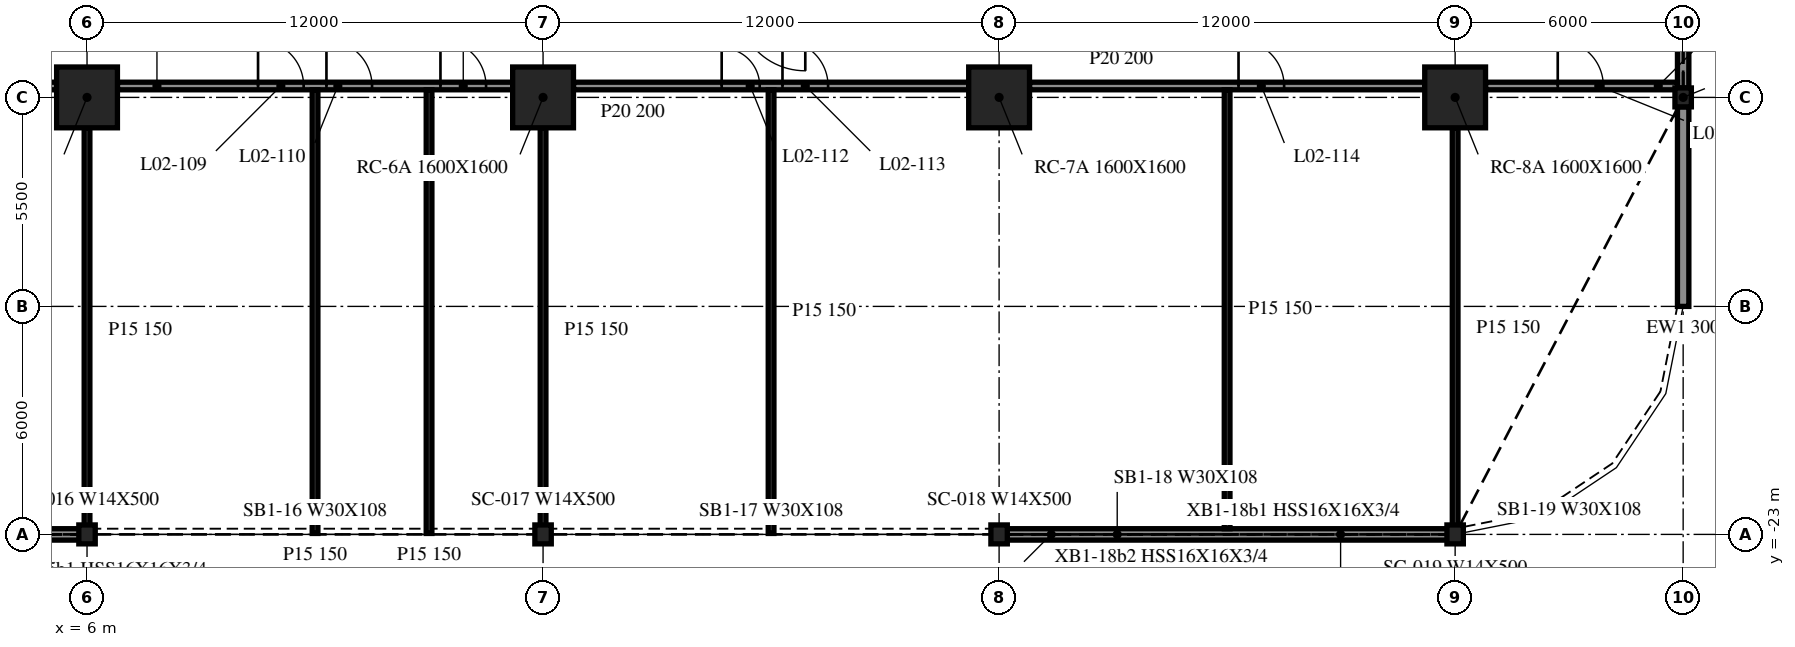
"""IFC4 building model, lengths in metres.
Left out: names, types, materials, properties, quantities, classifications, styles, units other than length and angle.
Written with IfcOpenShell. Run it as: python <this file> out.ifc"""

import sys

from ifc_helpers import new_model, si_unit, direction, frame, frame_2d, origin, origin_2d, place, context, subcontext, project, spatial, rectangle, i_section, extrude, element, fill, save


model = new_model("IFC4")
c1 = context("Model", 3, precision=1e-05, world=origin(), true_north=direction((0.0, 1.0)))
c2 = subcontext(c1, "Body", "Model", "MODEL_VIEW")
j1 = project(units=[si_unit("LENGTHUNIT", "METRE"), si_unit("PLANEANGLEUNIT", "RADIAN")], contexts=[c1])
p1 = place(None, origin())
s1 = spatial("IfcSite", under=j1, at=p1, CompositionType="ELEMENT")
p2 = place(p1, origin())
s2 = spatial("IfcBuilding", under=s1, at=p2, CompositionType="ELEMENT")
p3 = place(p2, frame((0.0, 0.0, 11.5)))
s3 = spatial("IfcBuildingStorey", under=s2, at=p3, CompositionType="ELEMENT", Elevation=11.5)
for number, where, z_axis, x_axis in (
    (1, (6.0, -11.5, -0.34), (0.0, 0.0, 1.0), (1.0, 0.0, 0.0)),
    (2, (18.0, -11.5, -0.34), (0.0, 0.0, 1.0), (1.0, 0.0, 0.0)),
    (3, (30.0, -11.5, -0.34), (0.0, 0.0, 1.0), (1.0, 0.0, 0.0)),
    (4, (42.0, -11.5, -0.34), (0.0, 0.0, 1.0), (1.0, 0.0, 0.0)),
):
    element("IfcColumn", number, at=place(p3, frame(where, z_axis=z_axis, x_axis=x_axis)), inside=s3, PredefinedType="COLUMN", context=c2, shape_type="SweptSolid", body=[
        extrude(rectangle(XDim=1.6, YDim=1.6, at=origin_2d()), origin(), (0.0, 0.0, 1.0), 4.3),
    ])
for number, where, z_axis, x_axis in (
    (5, (6.0, -23.0, -0.34), (0.0, 0.0, 1.0), (1.0, 0.0, 0.0)),
    (6, (18.0, -23.0, -0.34), (0.0, 0.0, 1.0), (1.0, 0.0, 0.0)),
    (7, (30.0, -23.0, -0.34), (0.0, 0.0, 1.0), (1.0, 0.0, 0.0)),
    (8, (42.0, -23.0, -0.34), (0.0, 0.0, 1.0), (1.0, 0.0, 0.0)),
    (9, (48.0, -11.5, -0.34), (0.0, 0.0, 1.0), (1.0, 0.0, 0.0)),
):
    element("IfcColumn", number, at=place(p3, frame(where, z_axis=z_axis, x_axis=x_axis)), inside=s3, PredefinedType="COLUMN", context=c2, shape_type="SweptSolid", body=[
        extrude(i_section(OverallWidth=0.432, OverallDepth=0.498, WebThickness=0.056, FlangeThickness=0.089, at=origin_2d()), origin(), (0.0, 0.0, 1.0), 4.3),
    ])
for number, where, z_axis, x_axis in (
    (10, (-5.972, -23.0, 0.0), (0.0, 0.0, 1.0), (1.0, 0.0, 0.0)),
    (11, (30.028, -23.0, 0.0), (0.0, 0.0, 1.0), (1.0, 0.0, 0.0)),
):
    element("IfcWall", number, at=place(p3, frame(where, z_axis=z_axis, x_axis=x_axis)), inside=s3, PredefinedType="NOTDEFINED", context=c2, shape_type="SweptSolid", body=[
        extrude(rectangle(XDim=11.944, YDim=0.3, at=frame_2d((5.972, 0.0))), origin(), (0.0, 0.0, 1.0), 3.203),
    ])
p4 = place(p3, frame((48.0, -17.0, 0.0), z_axis=(0.0, 0.0, 1.0), x_axis=(0.0, 1.0, 0.0)))
e12 = element("IfcWall", 12, at=p4, inside=s3, PredefinedType="NOTDEFINED", context=c2, shape_type="SweptSolid", body=[
    extrude(rectangle(XDim=5.251, YDim=0.3, at=frame_2d((2.625, 0.0))), origin(), (0.0, 0.0, 1.0), 3.203),
])
p5 = place(p3, frame((48.0, -11.251, 0.0), z_axis=(0.0, 0.0, 1.0), x_axis=(0.0, 1.0, 0.0)))
e13 = element("IfcWall", 13, at=p5, inside=s3, PredefinedType="NOTDEFINED", context=c2, shape_type="SweptSolid", body=[
    extrude(rectangle(XDim=11.002, YDim=0.3, at=frame_2d((5.501, 0.0))), origin(), (0.0, 0.0, 1.0), 3.203),
])
p6 = place(p3, frame((-5.2, -11.2, 0.0), z_axis=(0.0, 0.0, 1.0), x_axis=(1.0, 0.0, 0.0)))
e14 = element("IfcWall", 14, at=p6, inside=s3, PredefinedType="PARTITIONING", context=c2, shape_type="SweptSolid", body=[
    extrude(rectangle(XDim=10.4, YDim=0.2, at=frame_2d((5.2, 0.0))), origin(), (0.0, 0.0, 1.0), 3.96),
])
p7 = place(p6, frame((5.5, 0.0, 0.0)))
e15 = element("IfcOpeningElement", 15, at=p7, cuts=e14, PredefinedType="OPENING", context=c2, shape_type="SweptSolid", body=[
    extrude(rectangle(XDim=1.2, YDim=2.1, at=frame_2d((0.6, 1.05))), frame((0.0, 0.11, 0.0), z_axis=(0.0, -1.0, 0.0), x_axis=(1.0, 0.0, 0.0)), (0.0, 0.0, 1.0), 0.22),
])
p8 = place(p3, frame((6.8, -11.2, 0.0), z_axis=(0.0, 0.0, 1.0), x_axis=(1.0, 0.0, 0.0)))
e16 = element("IfcWall", 16, at=p8, inside=s3, PredefinedType="PARTITIONING", context=c2, shape_type="SweptSolid", body=[
    extrude(rectangle(XDim=10.4, YDim=0.2, at=frame_2d((5.2, 0.0))), origin(), (0.0, 0.0, 1.0), 3.96),
])
p9 = place(p8, frame((3.7, 0.0, 0.0)))
e17 = element("IfcOpeningElement", 17, at=p9, cuts=e16, PredefinedType="OPENING", context=c2, shape_type="SweptSolid", body=[
    extrude(rectangle(XDim=1.2, YDim=2.1, at=frame_2d((0.6, 1.05))), frame((0.0, 0.11, 0.0), z_axis=(0.0, -1.0, 0.0), x_axis=(1.0, 0.0, 0.0)), (0.0, 0.0, 1.0), 0.22),
])
p10 = place(p8, frame((5.5, 0.0, 0.0)))
e18 = element("IfcOpeningElement", 18, at=p10, cuts=e16, PredefinedType="OPENING", context=c2, shape_type="SweptSolid", body=[
    extrude(rectangle(XDim=1.2, YDim=2.1, at=frame_2d((0.6, 1.05))), frame((0.0, 0.11, 0.0), z_axis=(0.0, -1.0, 0.0), x_axis=(1.0, 0.0, 0.0)), (0.0, 0.0, 1.0), 0.22),
])
p11 = place(p8, frame((8.5, 0.0, 0.0)))
e19 = element("IfcOpeningElement", 19, at=p11, cuts=e16, PredefinedType="OPENING", context=c2, shape_type="SweptSolid", body=[
    extrude(rectangle(XDim=1.2, YDim=2.1, at=frame_2d((0.6, 1.05))), frame((0.0, 0.11, 0.0), z_axis=(0.0, -1.0, 0.0), x_axis=(1.0, 0.0, 0.0)), (0.0, 0.0, 1.0), 0.22),
])
p12 = place(p3, frame((18.8, -11.2, 0.0), z_axis=(0.0, 0.0, 1.0), x_axis=(1.0, 0.0, 0.0)))
e20 = element("IfcWall", 20, at=p12, inside=s3, PredefinedType="PARTITIONING", context=c2, shape_type="SweptSolid", body=[
    extrude(rectangle(XDim=10.4, YDim=0.2, at=frame_2d((5.2, 0.0))), origin(), (0.0, 0.0, 1.0), 3.96),
])
p13 = place(p12, frame((3.9, 0.0, 0.0)))
e21 = element("IfcOpeningElement", 21, at=p13, cuts=e20, PredefinedType="OPENING", context=c2, shape_type="SweptSolid", body=[
    extrude(rectangle(XDim=1.0, YDim=2.1, at=frame_2d((0.5, 1.05))), frame((0.0, 0.11, 0.0), z_axis=(0.0, -1.0, 0.0), x_axis=(1.0, 0.0, 0.0)), (0.0, 0.0, 1.0), 0.22),
])
p14 = place(p12, frame((5.5, 0.0, 0.0)))
e22 = element("IfcOpeningElement", 22, at=p14, cuts=e20, PredefinedType="OPENING", context=c2, shape_type="SweptSolid", body=[
    extrude(rectangle(XDim=1.2, YDim=2.1, at=frame_2d((0.6, 1.05))), frame((0.0, 0.11, 0.0), z_axis=(0.0, -1.0, 0.0), x_axis=(1.0, 0.0, 0.0)), (0.0, 0.0, 1.0), 0.22),
])
p15 = place(p3, frame((30.8, -11.2, 0.0), z_axis=(0.0, 0.0, 1.0), x_axis=(1.0, 0.0, 0.0)))
e23 = element("IfcWall", 23, at=p15, inside=s3, PredefinedType="PARTITIONING", context=c2, shape_type="SweptSolid", body=[
    extrude(rectangle(XDim=10.4, YDim=0.2, at=frame_2d((5.2, 0.0))), origin(), (0.0, 0.0, 1.0), 3.96),
])
p16 = place(p15, frame((5.5, 0.0, 0.0)))
e24 = element("IfcOpeningElement", 24, at=p16, cuts=e23, PredefinedType="OPENING", context=c2, shape_type="SweptSolid", body=[
    extrude(rectangle(XDim=1.2, YDim=2.1, at=frame_2d((0.6, 1.05))), frame((0.0, 0.11, 0.0), z_axis=(0.0, -1.0, 0.0), x_axis=(1.0, 0.0, 0.0)), (0.0, 0.0, 1.0), 0.22),
])
p17 = place(p3, frame((42.8, -11.2, 0.0), z_axis=(0.0, 0.0, 1.0), x_axis=(1.0, 0.0, 0.0)))
e25 = element("IfcWall", 25, at=p17, inside=s3, PredefinedType="PARTITIONING", context=c2, shape_type="SweptSolid", body=[
    extrude(rectangle(XDim=5.05, YDim=0.2, at=frame_2d((2.525, 0.0))), origin(), (0.0, 0.0, 1.0), 3.96),
])
p18 = place(p17, frame((1.9, 0.0, 0.0)))
e26 = element("IfcOpeningElement", 26, at=p18, cuts=e25, PredefinedType="OPENING", context=c2, shape_type="SweptSolid", body=[
    extrude(rectangle(XDim=1.2, YDim=2.1, at=frame_2d((0.6, 1.05))), frame((0.0, 0.11, 0.0), z_axis=(0.0, -1.0, 0.0), x_axis=(1.0, 0.0, 0.0)), (0.0, 0.0, 1.0), 0.22),
])
p19 = place(p3, frame((6.0, -22.975, 0.0), z_axis=(0.0, 0.0, 1.0), x_axis=(0.0, 1.0, 0.0)))
e27 = element("IfcWall", 27, at=p19, inside=s3, PredefinedType="PARTITIONING", context=c2, shape_type="SweptSolid", body=[
    extrude(rectangle(XDim=10.675, YDim=0.15, at=frame_2d((5.337, 0.0))), origin(), (0.0, 0.0, 1.0), 3.96),
])
for number, where, z_axis, x_axis in (
    (28, (12.0, -22.975, 0.0), (0.0, 0.0, 1.0), (0.0, 1.0, 0.0)),
    (29, (15.0, -22.975, 0.0), (0.0, 0.0, 1.0), (0.0, 1.0, 0.0)),
):
    element("IfcWall", number, at=place(p3, frame(where, z_axis=z_axis, x_axis=x_axis)), inside=s3, PredefinedType="PARTITIONING", context=c2, shape_type="SweptSolid", body=[
        extrude(rectangle(XDim=11.675, YDim=0.15, at=frame_2d((5.837, 0.0))), origin(), (0.0, 0.0, 1.0), 3.96),
    ])
p20 = place(p3, frame((18.0, -22.975, 0.0), z_axis=(0.0, 0.0, 1.0), x_axis=(0.0, 1.0, 0.0)))
e30 = element("IfcWall", 30, at=p20, inside=s3, PredefinedType="PARTITIONING", context=c2, shape_type="SweptSolid", body=[
    extrude(rectangle(XDim=10.675, YDim=0.15, at=frame_2d((5.337, 0.0))), origin(), (0.0, 0.0, 1.0), 3.96),
])
p21 = place(p3, frame((24.0, -22.975, 0.0), z_axis=(0.0, 0.0, 1.0), x_axis=(0.0, 1.0, 0.0)))
e31 = element("IfcWall", 31, at=p21, inside=s3, PredefinedType="PARTITIONING", context=c2, shape_type="SweptSolid", body=[
    extrude(rectangle(XDim=11.675, YDim=0.15, at=frame_2d((5.837, 0.0))), origin(), (0.0, 0.0, 1.0), 3.96),
])
p22 = place(p3, frame((36.0, -22.85, 0.0), z_axis=(0.0, 0.0, 1.0), x_axis=(0.0, 1.0, 0.0)))
e32 = element("IfcWall", 32, at=p22, inside=s3, PredefinedType="PARTITIONING", context=c2, shape_type="SweptSolid", body=[
    extrude(rectangle(XDim=11.55, YDim=0.15, at=frame_2d((5.775, 0.0))), origin(), (0.0, 0.0, 1.0), 3.96),
])
p23 = place(p3, frame((42.0, -22.847, 0.0), z_axis=(0.0, 0.0, 1.0), x_axis=(0.0, 1.0, 0.0)))
e33 = element("IfcWall", 33, at=p23, inside=s3, PredefinedType="PARTITIONING", context=c2, shape_type="SweptSolid", body=[
    extrude(rectangle(XDim=10.547, YDim=0.15, at=frame_2d((5.273, 0.0))), origin(), (0.0, 0.0, 1.0), 3.96),
])
p24 = place(p9, origin())
e34 = element("IfcDoor", 34, at=p24, inside=s3, OperationType="SINGLE_SWING_RIGHT", PredefinedType="DOOR", context=c2, shape_type="SweptSolid", body=[
    extrude(rectangle(XDim=1.2, YDim=2.1, at=frame_2d((0.6, 1.05))), frame((0.0, 0.025, 0.0), z_axis=(0.0, -1.0, 0.0), x_axis=(1.0, 0.0, 0.0)), (0.0, 0.0, 1.0), 0.05),
])
fill(e17, e34)
p25 = place(p10, origin())
e35 = element("IfcDoor", 35, at=p25, inside=s3, OperationType="SINGLE_SWING_LEFT", PredefinedType="DOOR", context=c2, shape_type="SweptSolid", body=[
    extrude(rectangle(XDim=1.2, YDim=2.1, at=frame_2d((0.6, 1.05))), frame((0.0, 0.025, 0.0), z_axis=(0.0, -1.0, 0.0), x_axis=(1.0, 0.0, 0.0)), (0.0, 0.0, 1.0), 0.05),
])
fill(e18, e35)
p26 = place(p11, origin())
e36 = element("IfcDoor", 36, at=p26, inside=s3, OperationType="SINGLE_SWING_LEFT", PredefinedType="DOOR", context=c2, shape_type="SweptSolid", body=[
    extrude(rectangle(XDim=1.2, YDim=2.1, at=frame_2d((0.6, 1.05))), frame((0.0, 0.025, 0.0), z_axis=(0.0, -1.0, 0.0), x_axis=(1.0, 0.0, 0.0)), (0.0, 0.0, 1.0), 0.05),
])
fill(e19, e36)
p27 = place(p13, origin())
e37 = element("IfcDoor", 37, at=p27, inside=s3, OperationType="SINGLE_SWING_RIGHT", PredefinedType="DOOR", context=c2, shape_type="SweptSolid", body=[
    extrude(rectangle(XDim=1.0, YDim=2.1, at=frame_2d((0.5, 1.05))), frame((0.0, 0.025, 0.0), z_axis=(0.0, -1.0, 0.0), x_axis=(1.0, 0.0, 0.0)), (0.0, 0.0, 1.0), 0.05),
])
fill(e21, e37)
p28 = place(p14, origin())
e38 = element("IfcDoor", 38, at=p28, inside=s3, OperationType="SINGLE_SWING_LEFT", PredefinedType="DOOR", context=c2, shape_type="SweptSolid", body=[
    extrude(rectangle(XDim=1.2, YDim=2.1, at=frame_2d((0.6, 1.05))), frame((0.0, 0.025, 0.0), z_axis=(0.0, -1.0, 0.0), x_axis=(1.0, 0.0, 0.0)), (0.0, 0.0, 1.0), 0.05),
])
fill(e22, e38)
p29 = place(p16, origin())
e39 = element("IfcDoor", 39, at=p29, inside=s3, OperationType="SINGLE_SWING_LEFT", PredefinedType="DOOR", context=c2, shape_type="SweptSolid", body=[
    extrude(rectangle(XDim=1.2, YDim=2.1, at=frame_2d((0.6, 1.05))), frame((0.0, 0.025, 0.0), z_axis=(0.0, -1.0, 0.0), x_axis=(1.0, 0.0, 0.0)), (0.0, 0.0, 1.0), 0.05),
])
fill(e24, e39)
p30 = place(p18, origin())
e40 = element("IfcDoor", 40, at=p30, inside=s3, OperationType="SINGLE_SWING_RIGHT", PredefinedType="DOOR", context=c2, shape_type="SweptSolid", body=[
    extrude(rectangle(XDim=1.2, YDim=2.1, at=frame_2d((0.6, 1.05))), frame((0.0, 0.025, 0.0), z_axis=(0.0, -1.0, 0.0), x_axis=(1.0, 0.0, 0.0)), (0.0, 0.0, 1.0), 0.05),
])
fill(e26, e40)
save(model, sys.argv[1])
